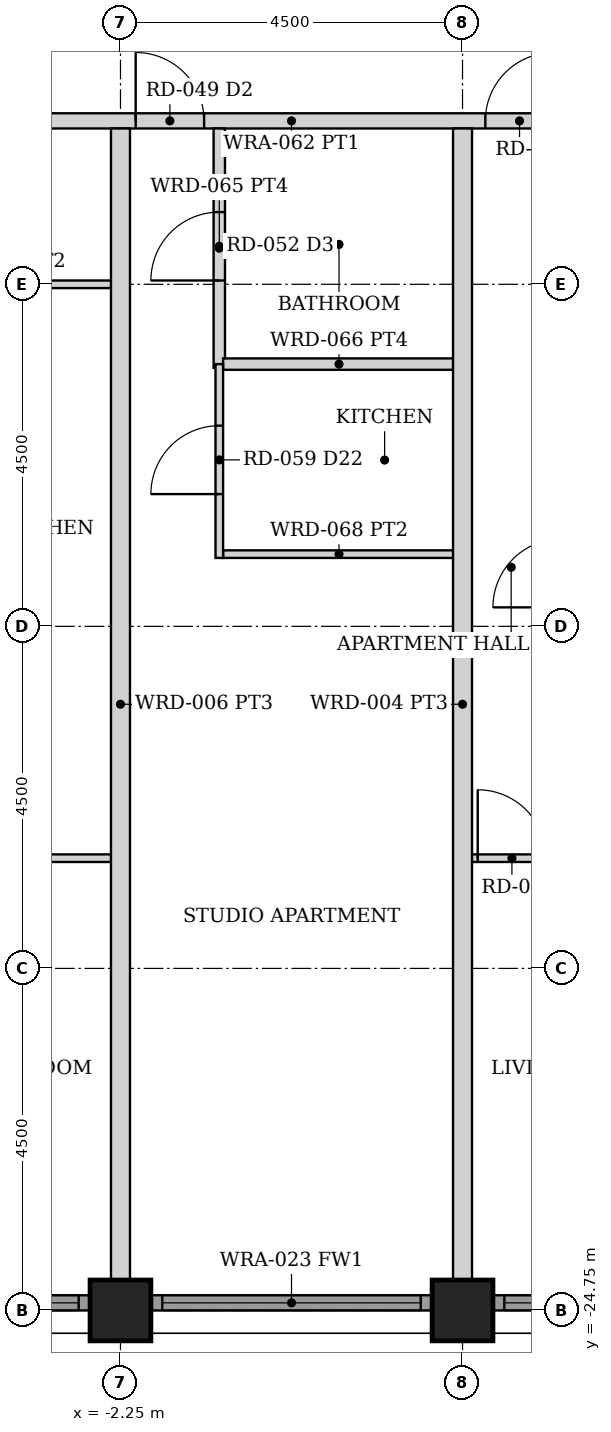
"""IFC4 building model, lengths in metres.
Left out: names, types, materials, properties, quantities, classifications, styles, units other than length and angle.
Written with IfcOpenShell. Run it as: python <this file> out.ifc"""

import sys

from ifc_helpers import new_model, si_unit, direction, frame, frame_2d, origin, origin_2d, place, context, subcontext, project, spatial, rectangle, hollow_rectangle, extrude, element, fill, save


model = new_model("IFC4")
c1 = context("Model", 3, precision=1e-05, world=origin(), true_north=direction((0.0, 1.0)))
c2 = subcontext(c1, "Body", "Model", "MODEL_VIEW")
j1 = project(units=[si_unit("LENGTHUNIT", "METRE"), si_unit("PLANEANGLEUNIT", "RADIAN")], contexts=[c1])
p1 = place(None, origin())
s1 = spatial("IfcSite", under=j1, at=p1, CompositionType="ELEMENT")
p2 = place(p1, origin())
s2 = spatial("IfcBuilding", under=s1, at=p2, CompositionType="ELEMENT")
p3 = place(p2, frame((0.0, 0.0, 58.0)))
s3 = spatial("IfcBuildingStorey", under=s2, at=p3, CompositionType="ELEMENT", Elevation=58.0)
for number, where, z_axis, x_axis in (
    (1, (-2.25, -24.75, 0.0), (0.0, 0.0, 1.0), (0.0, 1.0, 0.0)),
    (2, (2.25, -24.75, 0.0), (0.0, 0.0, 1.0), (0.0, 1.0, 0.0)),
):
    element("IfcColumn", number, at=place(p3, frame(where, z_axis=z_axis, x_axis=x_axis)), inside=s3, PredefinedType="COLUMN", context=c2, shape_type="SweptSolid", body=[
        extrude(hollow_rectangle(XDim=0.8, YDim=0.8, WallThickness=0.06, at=origin_2d()), origin(), (0.0, 0.0, 1.0), 3.5),
    ])
p4 = place(p3, frame((-6.345, -24.65, 0.0), z_axis=(0.0, 0.0, 1.0), x_axis=(1.0, 0.0, 0.0)))
e3 = element("IfcWall", 3, at=p4, inside=s3, PredefinedType="SOLIDWALL", context=c2, shape_type="SweptSolid", body=[
    extrude(rectangle(XDim=3.69, YDim=0.2, at=frame_2d((1.845, 0.0))), origin(), (0.0, 0.0, 1.0), 2.379),
])
p5 = place(p4, frame((0.145, 0.0, 0.3)))
e4 = element("IfcOpeningElement", 4, at=p5, cuts=e3, PredefinedType="OPENING", context=c2, shape_type="SweptSolid", body=[
    extrude(rectangle(XDim=3.4, YDim=1.929, at=frame_2d((1.7, 0.964))), frame((0.0, 0.11, 0.0), z_axis=(0.0, -1.0, 0.0), x_axis=(1.0, 0.0, 0.0)), (0.0, 0.0, 1.0), 0.22),
])
p6 = place(p3, frame((-1.845, -24.65, 0.0), z_axis=(0.0, 0.0, 1.0), x_axis=(1.0, 0.0, 0.0)))
e5 = element("IfcWall", 5, at=p6, inside=s3, PredefinedType="SOLIDWALL", context=c2, shape_type="SweptSolid", body=[
    extrude(rectangle(XDim=3.69, YDim=0.2, at=frame_2d((1.845, 0.0))), origin(), (0.0, 0.0, 1.0), 2.379),
])
p7 = place(p6, frame((0.145, 0.0, 0.3)))
e6 = element("IfcOpeningElement", 6, at=p7, cuts=e5, PredefinedType="OPENING", context=c2, shape_type="SweptSolid", body=[
    extrude(rectangle(XDim=3.4, YDim=1.929, at=frame_2d((1.7, 0.964))), frame((0.0, 0.11, 0.0), z_axis=(0.0, -1.0, 0.0), x_axis=(1.0, 0.0, 0.0)), (0.0, 0.0, 1.0), 0.22),
])
p8 = place(p3, frame((2.655, -24.65, 0.0), z_axis=(0.0, 0.0, 1.0), x_axis=(1.0, 0.0, 0.0)))
e7 = element("IfcWall", 7, at=p8, inside=s3, PredefinedType="SOLIDWALL", context=c2, shape_type="SweptSolid", body=[
    extrude(rectangle(XDim=3.69, YDim=0.2, at=frame_2d((1.845, 0.0))), origin(), (0.0, 0.0, 1.0), 2.379),
])
p9 = place(p8, frame((0.145, 0.0, 0.3)))
e8 = element("IfcOpeningElement", 8, at=p9, cuts=e7, PredefinedType="OPENING", context=c2, shape_type="SweptSolid", body=[
    extrude(rectangle(XDim=3.4, YDim=1.929, at=frame_2d((1.7, 0.964))), frame((0.0, 0.11, 0.0), z_axis=(0.0, -1.0, 0.0), x_axis=(1.0, 0.0, 0.0)), (0.0, 0.0, 1.0), 0.22),
])
p10 = place(p3, frame((-24.55, -9.1, 0.0), z_axis=(0.0, 0.0, 1.0), x_axis=(1.0, 0.0, 0.0)))
e9 = element("IfcWall", 9, at=p10, inside=s3, PredefinedType="PARTITIONING", context=c2, shape_type="SweptSolid", body=[
    extrude(rectangle(XDim=49.1, YDim=0.2, at=frame_2d((24.55, 0.0))), origin(), (0.0, 0.0, 1.0), 2.373),
])
p11 = place(p10, frame((5.1, 0.0, 0.0)))
e10 = element("IfcOpeningElement", 10, at=p11, cuts=e9, PredefinedType="OPENING", context=c2, shape_type="SweptSolid", body=[
    extrude(rectangle(XDim=0.9, YDim=2.1, at=frame_2d((0.45, 1.05))), frame((0.0, 0.11, 0.0), z_axis=(0.0, -1.0, 0.0), x_axis=(1.0, 0.0, 0.0)), (0.0, 0.0, 1.0), 0.22),
])
p12 = place(p10, frame((18.1, 0.0, 0.0)))
e11 = element("IfcOpeningElement", 11, at=p12, cuts=e9, PredefinedType="OPENING", context=c2, shape_type="SweptSolid", body=[
    extrude(rectangle(XDim=0.9, YDim=2.1, at=frame_2d((0.45, 1.05))), frame((0.0, 0.11, 0.0), z_axis=(0.0, -1.0, 0.0), x_axis=(1.0, 0.0, 0.0)), (0.0, 0.0, 1.0), 0.22),
])
p13 = place(p10, frame((22.5, 0.0, 0.0)))
e12 = element("IfcOpeningElement", 12, at=p13, cuts=e9, PredefinedType="OPENING", context=c2, shape_type="SweptSolid", body=[
    extrude(rectangle(XDim=0.9, YDim=2.1, at=frame_2d((0.45, 1.05))), frame((0.0, 0.11, 0.0), z_axis=(0.0, -1.0, 0.0), x_axis=(1.0, 0.0, 0.0)), (0.0, 0.0, 1.0), 0.22),
])
p14 = place(p10, frame((27.1, 0.0, 0.0)))
e13 = element("IfcOpeningElement", 13, at=p14, cuts=e9, PredefinedType="OPENING", context=c2, shape_type="SweptSolid", body=[
    extrude(rectangle(XDim=0.9, YDim=2.1, at=frame_2d((0.45, 1.05))), frame((0.0, 0.11, 0.0), z_axis=(0.0, -1.0, 0.0), x_axis=(1.0, 0.0, 0.0)), (0.0, 0.0, 1.0), 0.22),
])
p15 = place(p10, frame((43.1, 0.0, 0.0)))
e14 = element("IfcOpeningElement", 14, at=p15, cuts=e9, PredefinedType="OPENING", context=c2, shape_type="SweptSolid", body=[
    extrude(rectangle(XDim=0.9, YDim=2.1, at=frame_2d((0.45, 1.05))), frame((0.0, 0.11, 0.0), z_axis=(0.0, -1.0, 0.0), x_axis=(1.0, 0.0, 0.0)), (0.0, 0.0, 1.0), 0.22),
])
p16 = place(p3, frame((-5.45, -11.25, 0.0), z_axis=(0.0, 0.0, 1.0), x_axis=(1.0, 0.0, 0.0)))
e15 = element("IfcWall", 15, at=p16, inside=s3, PredefinedType="PARTITIONING", context=c2, shape_type="SweptSolid", body=[
    extrude(rectangle(XDim=3.14, YDim=0.1, at=frame_2d((1.57, 0.0))), origin(), (0.0, 0.0, 1.0), 2.373),
])
p17 = place(p3, frame((-6.7, -18.8, 0.0), z_axis=(0.0, 0.0, 1.0), x_axis=(1.0, 0.0, 0.0)))
e16 = element("IfcWall", 16, at=p17, inside=s3, PredefinedType="PARTITIONING", context=c2, shape_type="SweptSolid", body=[
    extrude(rectangle(XDim=4.39, YDim=0.1, at=frame_2d((2.195, 0.0))), origin(), (0.0, 0.0, 1.0), 2.373),
])
p18 = place(p17, frame((0.15, 0.0, 0.0)))
e17 = element("IfcOpeningElement", 17, at=p18, cuts=e16, PredefinedType="OPENING", context=c2, shape_type="SweptSolid", body=[
    extrude(rectangle(XDim=0.9, YDim=2.1, at=frame_2d((0.45, 1.05))), frame((0.0, 0.06, 0.0), z_axis=(0.0, -1.0, 0.0), x_axis=(1.0, 0.0, 0.0)), (0.0, 0.0, 1.0), 0.12),
])
p19 = place(p3, frame((-0.95, -12.35, 0.0), z_axis=(0.0, 0.0, 1.0), x_axis=(0.0, 1.0, 0.0)))
e18 = element("IfcWall", 18, at=p19, inside=s3, PredefinedType="PARTITIONING", context=c2, shape_type="SweptSolid", body=[
    extrude(rectangle(XDim=3.15, YDim=0.15, at=frame_2d((1.575, 0.0))), origin(), (0.0, 0.0, 1.0), 2.373),
])
p20 = place(p19, frame((1.15, 0.0, 0.0)))
e19 = element("IfcOpeningElement", 19, at=p20, cuts=e18, PredefinedType="OPENING", context=c2, shape_type="SweptSolid", body=[
    extrude(rectangle(XDim=0.9, YDim=2.1, at=frame_2d((0.45, 1.05))), frame((0.0, 0.085, 0.0), z_axis=(0.0, -1.0, 0.0), x_axis=(1.0, 0.0, 0.0)), (0.0, 0.0, 1.0), 0.17),
])
p21 = place(p3, frame((-0.9, -12.3, 0.0), z_axis=(0.0, 0.0, 1.0), x_axis=(1.0, 0.0, 0.0)))
e20 = element("IfcWall", 20, at=p21, inside=s3, PredefinedType="PARTITIONING", context=c2, shape_type="SweptSolid", body=[
    extrude(rectangle(XDim=3.05, YDim=0.15, at=frame_2d((1.525, 0.0))), origin(), (0.0, 0.0, 1.0), 2.373),
])
p22 = place(p3, frame((-0.9, -14.8, 0.0), z_axis=(0.0, 0.0, 1.0), x_axis=(1.0, 0.0, 0.0)))
e21 = element("IfcWall", 21, at=p22, inside=s3, PredefinedType="PARTITIONING", context=c2, shape_type="SweptSolid", body=[
    extrude(rectangle(XDim=3.05, YDim=0.1, at=frame_2d((1.525, 0.0))), origin(), (0.0, 0.0, 1.0), 2.373),
])
p23 = place(p3, frame((-0.95, -14.85, 0.0), z_axis=(0.0, 0.0, 1.0), x_axis=(0.0, 1.0, 0.0)))
e22 = element("IfcWall", 22, at=p23, inside=s3, PredefinedType="PARTITIONING", context=c2, shape_type="SweptSolid", body=[
    extrude(rectangle(XDim=2.55, YDim=0.1, at=frame_2d((1.275, 0.0))), origin(), (0.0, 0.0, 1.0), 2.373),
])
p24 = place(p23, frame((0.84, 0.0, 0.0)))
e23 = element("IfcOpeningElement", 23, at=p24, cuts=e22, PredefinedType="OPENING", context=c2, shape_type="SweptSolid", body=[
    extrude(rectangle(XDim=0.9, YDim=2.1, at=frame_2d((0.45, 1.05))), frame((0.0, 0.06, 0.0), z_axis=(0.0, -1.0, 0.0), x_axis=(1.0, 0.0, 0.0)), (0.0, 0.0, 1.0), 0.12),
])
p25 = place(p3, frame((2.31, -18.8, 0.0), z_axis=(0.0, 0.0, 1.0), x_axis=(1.0, 0.0, 0.0)))
e24 = element("IfcWall", 24, at=p25, inside=s3, PredefinedType="PARTITIONING", context=c2, shape_type="SweptSolid", body=[
    extrude(rectangle(XDim=4.39, YDim=0.1, at=frame_2d((2.195, 0.0))), origin(), (0.0, 0.0, 1.0), 2.373),
])
p26 = place(p25, frame((0.14, 0.0, 0.0)))
e25 = element("IfcOpeningElement", 25, at=p26, cuts=e24, PredefinedType="OPENING", context=c2, shape_type="SweptSolid", body=[
    extrude(rectangle(XDim=0.9, YDim=2.1, at=frame_2d((0.45, 1.05))), frame((0.0, 0.06, 0.0), z_axis=(0.0, -1.0, 0.0), x_axis=(1.0, 0.0, 0.0)), (0.0, 0.0, 1.0), 0.12),
])
for number, where, z_axis, x_axis in (
    (26, (-2.25, -24.35, 0.0), (0.0, 0.0, 1.0), (0.0, 1.0, 0.0)),
    (27, (2.25, -24.35, 0.0), (0.0, 0.0, 1.0), (0.0, 1.0, 0.0)),
):
    element("IfcWall", number, at=place(p3, frame(where, z_axis=z_axis, x_axis=x_axis)), inside=s3, PredefinedType="PARTITIONING", context=c2, shape_type="SweptSolid", body=[
        extrude(rectangle(XDim=15.15, YDim=0.25, at=frame_2d((7.575, 0.0))), origin(), (0.0, 0.0, 1.0), 2.373),
    ])
p27 = place(p5, origin())
e28 = element("IfcWindow", 28, at=p27, inside=s3, PartitioningType="SINGLE_PANEL", PredefinedType="WINDOW", context=c2, shape_type="SweptSolid", body=[
    extrude(rectangle(XDim=3.4, YDim=1.929, at=frame_2d((1.7, 0.964))), frame((0.0, 0.03, 0.0), z_axis=(0.0, -1.0, 0.0), x_axis=(1.0, 0.0, 0.0)), (0.0, 0.0, 1.0), 0.06),
])
fill(e4, e28)
p28 = place(p7, origin())
e29 = element("IfcWindow", 29, at=p28, inside=s3, PartitioningType="SINGLE_PANEL", PredefinedType="WINDOW", context=c2, shape_type="SweptSolid", body=[
    extrude(rectangle(XDim=3.4, YDim=1.929, at=frame_2d((1.7, 0.964))), frame((0.0, 0.03, 0.0), z_axis=(0.0, -1.0, 0.0), x_axis=(1.0, 0.0, 0.0)), (0.0, 0.0, 1.0), 0.06),
])
fill(e6, e29)
p29 = place(p9, origin())
e30 = element("IfcWindow", 30, at=p29, inside=s3, PartitioningType="SINGLE_PANEL", PredefinedType="WINDOW", context=c2, shape_type="SweptSolid", body=[
    extrude(rectangle(XDim=3.4, YDim=1.929, at=frame_2d((1.7, 0.964))), frame((0.0, 0.03, 0.0), z_axis=(0.0, -1.0, 0.0), x_axis=(1.0, 0.0, 0.0)), (0.0, 0.0, 1.0), 0.06),
])
fill(e8, e30)
p30 = place(p13, origin())
e31 = element("IfcDoor", 31, at=p30, inside=s3, OperationType="SINGLE_SWING_LEFT", PredefinedType="DOOR", context=c2, shape_type="SweptSolid", body=[
    extrude(rectangle(XDim=0.9, YDim=2.1, at=frame_2d((0.45, 1.05))), frame((0.0, 0.025, 0.0), z_axis=(0.0, -1.0, 0.0), x_axis=(1.0, 0.0, 0.0)), (0.0, 0.0, 1.0), 0.05),
])
fill(e12, e31)
p31 = place(p20, origin())
e32 = element("IfcDoor", 32, at=p31, inside=s3, OperationType="SINGLE_SWING_LEFT", PredefinedType="DOOR", context=c2, shape_type="SweptSolid", body=[
    extrude(rectangle(XDim=0.9, YDim=2.1, at=frame_2d((0.45, 1.05))), frame((0.0, 0.025, 0.0), z_axis=(0.0, -1.0, 0.0), x_axis=(1.0, 0.0, 0.0)), (0.0, 0.0, 1.0), 0.05),
])
fill(e19, e32)
p32 = place(p24, origin())
e33 = element("IfcDoor", 33, at=p32, inside=s3, OperationType="SINGLE_SWING_LEFT", PredefinedType="DOOR", context=c2, shape_type="SweptSolid", body=[
    extrude(rectangle(XDim=0.9, YDim=2.1, at=frame_2d((0.45, 1.05))), frame((0.0, 0.025, 0.0), z_axis=(0.0, -1.0, 0.0), x_axis=(1.0, 0.0, 0.0)), (0.0, 0.0, 1.0), 0.05),
])
fill(e23, e33)
p33 = place(p14, origin())
e34 = element("IfcDoor", 34, at=p33, inside=s3, OperationType="SINGLE_SWING_RIGHT", PredefinedType="DOOR", context=c2, shape_type="SweptSolid", body=[
    extrude(rectangle(XDim=0.9, YDim=2.1, at=frame_2d((0.45, 1.05))), frame((0.0, 0.025, 0.0), z_axis=(0.0, -1.0, 0.0), x_axis=(1.0, 0.0, 0.0)), (0.0, 0.0, 1.0), 0.05),
])
fill(e13, e34)
p34 = place(p26, origin())
e35 = element("IfcDoor", 35, at=p34, inside=s3, OperationType="SINGLE_SWING_LEFT", PredefinedType="DOOR", context=c2, shape_type="SweptSolid", body=[
    extrude(rectangle(XDim=0.9, YDim=2.1, at=frame_2d((0.45, 1.05))), frame((0.0, 0.025, 0.0), z_axis=(0.0, -1.0, 0.0), x_axis=(1.0, 0.0, 0.0)), (0.0, 0.0, 1.0), 0.05),
])
fill(e25, e35)
save(model, sys.argv[1])
